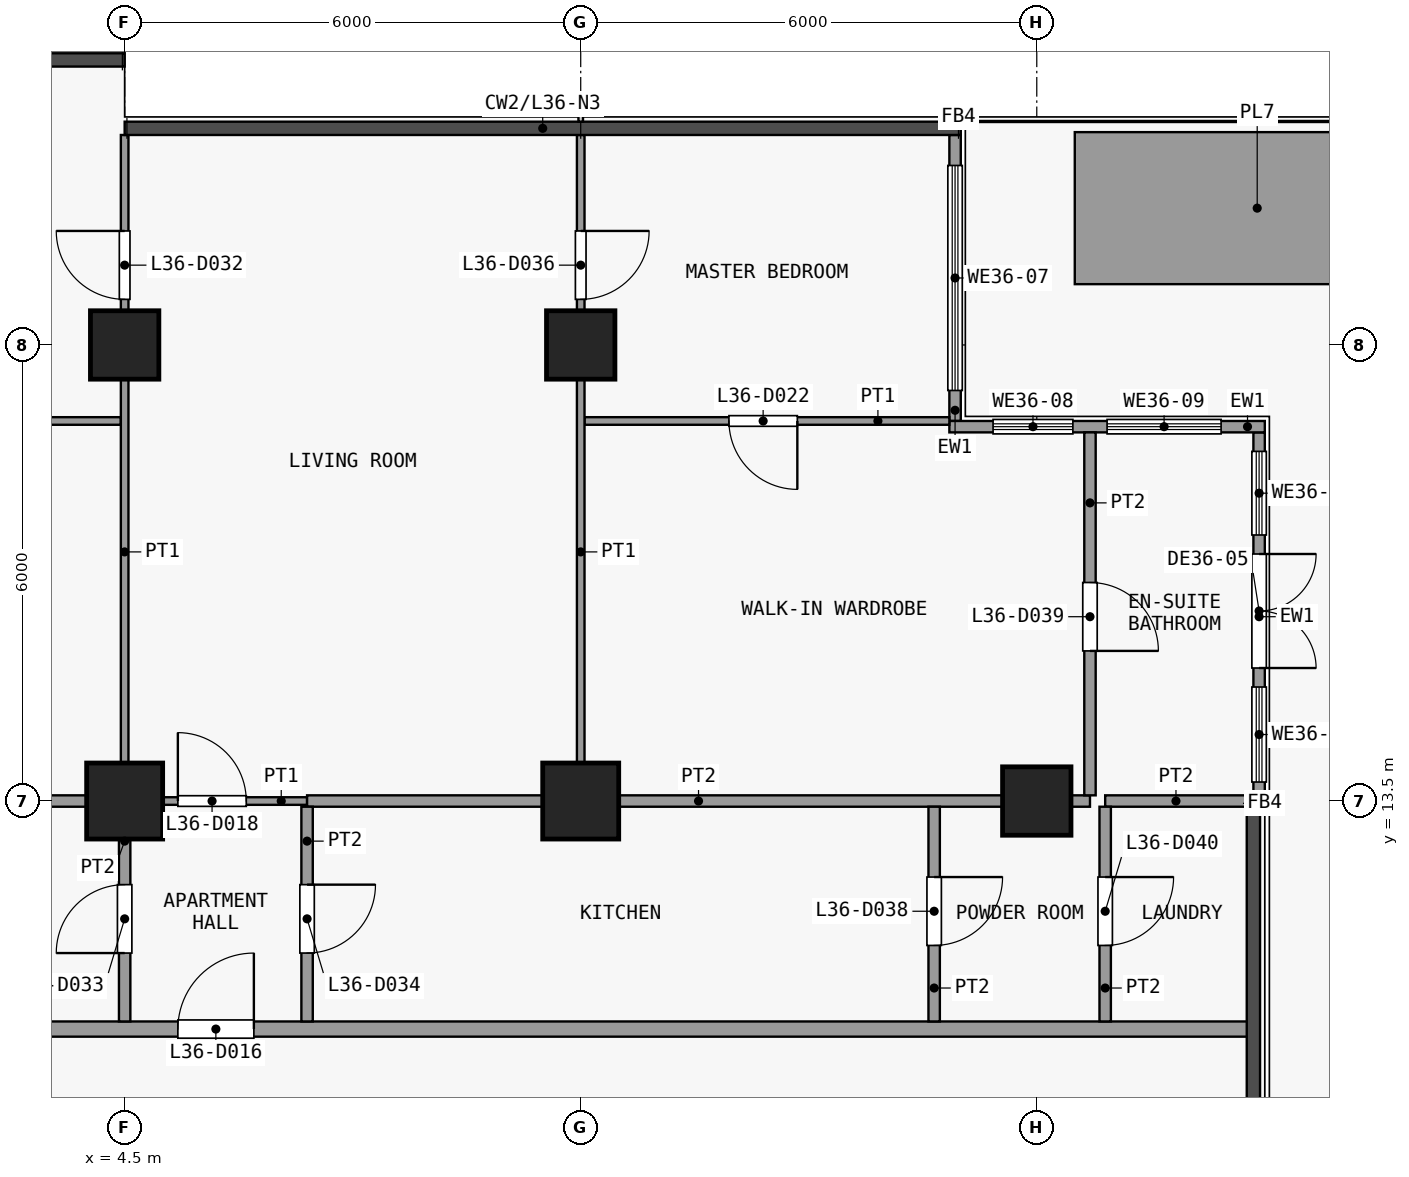
"""IFC4 building model, lengths in metres.
Left out: names, types, materials, properties, quantities, classifications, styles, units other than length and angle.
Written with IfcOpenShell. Run it as: python <this file> out.ifc"""

import sys

from ifc_helpers import new_model, si_unit, direction, frame, frame_2d, origin, origin_2d, place, context, subcontext, project, spatial, rectangle, extrude, element, fill, save


model = new_model("IFC4")
c1 = context("Model", 3, precision=1e-05, world=origin(), true_north=direction((0.0, 1.0)))
c2 = subcontext(c1, "Body", "Model", "MODEL_VIEW")
j1 = project(units=[si_unit("LENGTHUNIT", "METRE"), si_unit("PLANEANGLEUNIT", "RADIAN")], contexts=[c1])
p1 = place(None, origin())
s1 = spatial("IfcSite", under=j1, at=p1, CompositionType="ELEMENT")
p2 = place(p1, origin())
s2 = spatial("IfcBuilding", under=s1, at=p2, CompositionType="ELEMENT")
p3 = place(p2, frame((0.0, 0.0, 149.3)))
s3 = spatial("IfcBuildingStorey", under=s2, at=p3, CompositionType="ELEMENT", Elevation=149.3)
p4 = place(p3, frame((4.5, 13.5, 0.0), z_axis=(0.0, 0.0, 1.0), x_axis=(1.0, 0.0, 0.0)))
e1 = element("IfcColumn", 1, at=p4, inside=s3, PredefinedType="COLUMN", context=c2, shape_type="SweptSolid", body=[
    extrude(rectangle(XDim=1.0, YDim=1.0, at=origin_2d()), origin(), (0.0, 0.0, 1.0), 3.6),
])
p5 = place(p3, frame((4.5, 19.5, 0.0), z_axis=(0.0, 0.0, 1.0), x_axis=(1.0, 0.0, 0.0)))
e2 = element("IfcColumn", 2, at=p5, inside=s3, PredefinedType="COLUMN", context=c2, shape_type="SweptSolid", body=[
    extrude(rectangle(XDim=0.9, YDim=0.9, at=origin_2d()), origin(), (0.0, 0.0, 1.0), 3.6),
])
p6 = place(p3, frame((10.5, 13.5, 0.0), z_axis=(0.0, 0.0, 1.0), x_axis=(1.0, 0.0, 0.0)))
e3 = element("IfcColumn", 3, at=p6, inside=s3, PredefinedType="COLUMN", context=c2, shape_type="SweptSolid", body=[
    extrude(rectangle(XDim=1.0, YDim=1.0, at=origin_2d()), origin(), (0.0, 0.0, 1.0), 3.6),
])
for number, where, z_axis, x_axis in (
    (4, (10.5, 19.5, 0.0), (0.0, 0.0, 1.0), (1.0, 0.0, 0.0)),
    (5, (16.5, 13.5, 0.0), (0.0, 0.0, 1.0), (1.0, 0.0, 0.0)),
):
    element("IfcColumn", number, at=place(p3, frame(where, z_axis=z_axis, x_axis=x_axis)), inside=s3, PredefinedType="COLUMN", context=c2, shape_type="SweptSolid", body=[
        extrude(rectangle(XDim=0.9, YDim=0.9, at=origin_2d()), origin(), (0.0, 0.0, 1.0), 3.6),
    ])
p7 = place(p3, frame((15.425, 22.262, 0.0), z_axis=(0.0, 0.0, 1.0), x_axis=(0.0, -1.0, 0.0)))
e6 = element("IfcWall", 6, at=p7, inside=s3, PredefinedType="SOLIDWALL", context=c2, shape_type="SweptSolid", body=[
    extrude(rectangle(XDim=3.762, YDim=0.15, at=frame_2d((1.881, 0.0))), origin(), (0.0, 0.0, 1.0), 3.3),
])
p8 = place(p7, frame((0.401, 0.0, 0.9)))
e7 = element("IfcOpeningElement", 7, at=p8, cuts=e6, PredefinedType="OPENING", context=c2, shape_type="SweptSolid", body=[
    extrude(rectangle(XDim=2.96, YDim=2.4, at=frame_2d((1.48, 1.2))), frame((0.0, 0.085, 0.0), z_axis=(0.0, -1.0, 0.0), x_axis=(1.0, 0.0, 0.0)), (0.0, 0.0, 1.0), 0.17),
])
p9 = place(p3, frame((15.35, 18.425, 0.0), z_axis=(0.0, 0.0, 1.0), x_axis=(1.0, 0.0, 0.0)))
e8 = element("IfcWall", 8, at=p9, inside=s3, PredefinedType="SOLIDWALL", context=c2, shape_type="SweptSolid", body=[
    extrude(rectangle(XDim=4.15, YDim=0.15, at=frame_2d((2.075, 0.0))), origin(), (0.0, 0.0, 1.0), 3.3),
])
p10 = place(p9, frame((0.575, 0.0, 0.9)))
e9 = element("IfcOpeningElement", 9, at=p10, cuts=e8, PredefinedType="OPENING", context=c2, shape_type="SweptSolid", body=[
    extrude(rectangle(XDim=1.05, YDim=2.4, at=frame_2d((0.525, 1.2))), frame((0.0, 0.085, 0.0), z_axis=(0.0, -1.0, 0.0), x_axis=(1.0, 0.0, 0.0)), (0.0, 0.0, 1.0), 0.17),
])
p11 = place(p9, frame((2.075, 0.0, 0.9)))
e10 = element("IfcOpeningElement", 10, at=p11, cuts=e8, PredefinedType="OPENING", context=c2, shape_type="SweptSolid", body=[
    extrude(rectangle(XDim=1.5, YDim=2.4, at=frame_2d((0.75, 1.2))), frame((0.0, 0.085, 0.0), z_axis=(0.0, -1.0, 0.0), x_axis=(1.0, 0.0, 0.0)), (0.0, 0.0, 1.0), 0.17),
])
p12 = place(p3, frame((19.425, 18.35, 0.0), z_axis=(0.0, 0.0, 1.0), x_axis=(0.0, -1.0, 0.0)))
e11 = element("IfcWall", 11, at=p12, inside=s3, PredefinedType="SOLIDWALL", context=c2, shape_type="SweptSolid", body=[
    extrude(rectangle(XDim=4.85, YDim=0.15, at=frame_2d((2.425, 0.0))), origin(), (0.0, 0.0, 1.0), 3.3),
])
p13 = place(p12, frame((1.6, 0.0, 0.0)))
e12 = element("IfcOpeningElement", 12, at=p13, cuts=e11, PredefinedType="OPENING", context=c2, shape_type="SweptSolid", body=[
    extrude(rectangle(XDim=1.5, YDim=2.4, at=frame_2d((0.75, 1.2))), frame((0.0, 0.085, 0.0), z_axis=(0.0, -1.0, 0.0), x_axis=(1.0, 0.0, 0.0)), (0.0, 0.0, 1.0), 0.17),
])
p14 = place(p12, frame((3.35, 0.0, 0.9)))
e13 = element("IfcOpeningElement", 13, at=p14, cuts=e11, PredefinedType="OPENING", context=c2, shape_type="SweptSolid", body=[
    extrude(rectangle(XDim=1.25, YDim=2.1, at=frame_2d((0.625, 1.05))), frame((0.0, 0.085, 0.0), z_axis=(0.0, -1.0, 0.0), x_axis=(1.0, 0.0, 0.0)), (0.0, 0.0, 1.0), 0.17),
])
p15 = place(p12, frame((0.25, 0.0, 0.9)))
e14 = element("IfcOpeningElement", 14, at=p15, cuts=e11, PredefinedType="OPENING", context=c2, shape_type="SweptSolid", body=[
    extrude(rectangle(XDim=1.1, YDim=2.1, at=frame_2d((0.55, 1.05))), frame((0.0, 0.085, 0.0), z_axis=(0.0, -1.0, 0.0), x_axis=(1.0, 0.0, 0.0)), (0.0, 0.0, 1.0), 0.17),
])
p16 = place(p3, frame((17.0, 21.3, 0.0), z_axis=(0.0, 0.0, 1.0), x_axis=(1.0, 0.0, 0.0)))
e15 = element("IfcWall", 15, at=p16, inside=s3, PredefinedType="USERDEFINED", context=c2, shape_type="SweptSolid", body=[
    extrude(rectangle(XDim=4.8, YDim=2.0, at=frame_2d((2.4, 0.0))), origin(), (0.0, 0.0, 1.0), 0.9),
])
p17 = place(p3, frame((-17.85, 10.5, 0.0), z_axis=(0.0, 0.0, 1.0), x_axis=(1.0, 0.0, 0.0)))
e16 = element("IfcWall", 16, at=p17, inside=s3, PredefinedType="PARTITIONING", context=c2, shape_type="SweptSolid", body=[
    extrude(rectangle(XDim=37.2, YDim=0.2, at=frame_2d((18.6, 0.0))), origin(), (0.0, 0.0, 1.0), 3.3),
])
p18 = place(p17, frame((5.55, 0.0, 0.0)))
e17 = element("IfcOpeningElement", 17, at=p18, cuts=e16, PredefinedType="OPENING", context=c2, shape_type="SweptSolid", body=[
    extrude(rectangle(XDim=1.0, YDim=2.1, at=frame_2d((0.5, 1.05))), frame((0.0, 0.11, 0.0), z_axis=(0.0, -1.0, 0.0), x_axis=(1.0, 0.0, 0.0)), (0.0, 0.0, 1.0), 0.22),
])
p19 = place(p17, frame((23.05, 0.0, 0.0)))
e18 = element("IfcOpeningElement", 18, at=p19, cuts=e16, PredefinedType="OPENING", context=c2, shape_type="SweptSolid", body=[
    extrude(rectangle(XDim=1.0, YDim=2.1, at=frame_2d((0.5, 1.05))), frame((0.0, 0.11, 0.0), z_axis=(0.0, -1.0, 0.0), x_axis=(1.0, 0.0, 0.0)), (0.0, 0.0, 1.0), 0.22),
])
p20 = place(p3, frame((4.5, 13.5, 0.0), z_axis=(0.0, 0.0, 1.0), x_axis=(1.0, 0.0, 0.0)))
e19 = element("IfcWall", 19, at=p20, inside=s3, PredefinedType="PARTITIONING", context=c2, shape_type="SweptSolid", body=[
    extrude(rectangle(XDim=2.4, YDim=0.1, at=frame_2d((1.2, 0.0))), origin(), (0.0, 0.0, 1.0), 3.3),
])
p21 = place(p20, frame((0.7, 0.0, 0.0)))
e20 = element("IfcOpeningElement", 20, at=p21, cuts=e19, PredefinedType="OPENING", context=c2, shape_type="SweptSolid", body=[
    extrude(rectangle(XDim=0.9, YDim=2.1, at=frame_2d((0.45, 1.05))), frame((0.0, 0.06, 0.0), z_axis=(0.0, -1.0, 0.0), x_axis=(1.0, 0.0, 0.0)), (0.0, 0.0, 1.0), 0.12),
])
p22 = place(p3, frame((0.0, 13.5, 0.0), z_axis=(0.0, 0.0, 1.0), x_axis=(1.0, 0.0, 0.0)))
e21 = element("IfcWall", 21, at=p22, inside=s3, PredefinedType="PARTITIONING", context=c2, shape_type="SweptSolid", body=[
    extrude(rectangle(XDim=4.5, YDim=0.15, at=frame_2d((2.25, 0.0))), origin(), (0.0, 0.0, 1.0), 3.3),
])
p23 = place(p3, frame((6.9, 13.5, 0.0), z_axis=(0.0, 0.0, 1.0), x_axis=(1.0, 0.0, 0.0)))
e22 = element("IfcWall", 22, at=p23, inside=s3, PredefinedType="PARTITIONING", context=c2, shape_type="SweptSolid", body=[
    extrude(rectangle(XDim=10.3, YDim=0.15, at=frame_2d((5.15, 0.0))), origin(), (0.0, 0.0, 1.0), 3.3),
])
p24 = place(p3, frame((17.4, 13.5, 0.0), z_axis=(0.0, 0.0, 1.0), x_axis=(1.0, 0.0, 0.0)))
e23 = element("IfcWall", 23, at=p24, inside=s3, PredefinedType="PARTITIONING", context=c2, shape_type="SweptSolid", body=[
    extrude(rectangle(XDim=1.863, YDim=0.15, at=frame_2d((0.931, 0.0))), origin(), (0.0, 0.0, 1.0), 3.3),
])
p25 = place(p3, frame((-4.4, 18.5, 0.0), z_axis=(0.0, 0.0, 1.0), x_axis=(1.0, 0.0, 0.0)))
e24 = element("IfcWall", 24, at=p25, inside=s3, PredefinedType="PARTITIONING", context=c2, shape_type="SweptSolid", body=[
    extrude(rectangle(XDim=8.85, YDim=0.1, at=frame_2d((4.425, 0.0))), origin(), (0.0, 0.0, 1.0), 3.3),
])
p26 = place(p25, frame((4.0, 0.0, 0.0)))
e25 = element("IfcOpeningElement", 25, at=p26, cuts=e24, PredefinedType="OPENING", context=c2, shape_type="SweptSolid", body=[
    extrude(rectangle(XDim=0.9, YDim=2.1, at=frame_2d((0.45, 1.05))), frame((0.0, 0.06, 0.0), z_axis=(0.0, -1.0, 0.0), x_axis=(1.0, 0.0, 0.0)), (0.0, 0.0, 1.0), 0.12),
])
p27 = place(p3, frame((10.55, 18.5, 0.0), z_axis=(0.0, 0.0, 1.0), x_axis=(1.0, 0.0, 0.0)))
e26 = element("IfcWall", 26, at=p27, inside=s3, PredefinedType="PARTITIONING", context=c2, shape_type="SweptSolid", body=[
    extrude(rectangle(XDim=4.8, YDim=0.1, at=frame_2d((2.4, 0.0))), origin(), (0.0, 0.0, 1.0), 3.3),
])
p28 = place(p27, frame((1.9, 0.0, 0.0)))
e27 = element("IfcOpeningElement", 27, at=p28, cuts=e26, PredefinedType="OPENING", context=c2, shape_type="SweptSolid", body=[
    extrude(rectangle(XDim=0.9, YDim=2.1, at=frame_2d((0.45, 1.05))), frame((0.0, 0.06, 0.0), z_axis=(0.0, -1.0, 0.0), x_axis=(1.0, 0.0, 0.0)), (0.0, 0.0, 1.0), 0.12),
])
p29 = place(p3, frame((4.5, 13.575, 0.0), z_axis=(0.0, 0.0, 1.0), x_axis=(0.0, 1.0, 0.0)))
e28 = element("IfcWall", 28, at=p29, inside=s3, PredefinedType="PARTITIONING", context=c2, shape_type="SweptSolid", body=[
    extrude(rectangle(XDim=8.688, YDim=0.1, at=frame_2d((4.344, 0.0))), origin(), (0.0, 0.0, 1.0), 3.3),
])
p30 = place(p29, frame((6.525, 0.0, 0.0)))
e29 = element("IfcOpeningElement", 29, at=p30, cuts=e28, PredefinedType="OPENING", context=c2, shape_type="SweptSolid", body=[
    extrude(rectangle(XDim=0.9, YDim=2.1, at=frame_2d((0.45, 1.05))), frame((0.0, 0.06, 0.0), z_axis=(0.0, -1.0, 0.0), x_axis=(1.0, 0.0, 0.0)), (0.0, 0.0, 1.0), 0.12),
])
p31 = place(p3, frame((4.5, 10.6, 0.0), z_axis=(0.0, 0.0, 1.0), x_axis=(0.0, 1.0, 0.0)))
e30 = element("IfcWall", 30, at=p31, inside=s3, PredefinedType="PARTITIONING", context=c2, shape_type="SweptSolid", body=[
    extrude(rectangle(XDim=2.825, YDim=0.15, at=frame_2d((1.413, 0.0))), origin(), (0.0, 0.0, 1.0), 3.3),
])
p32 = place(p31, frame((0.9, 0.0, 0.0)))
e31 = element("IfcOpeningElement", 31, at=p32, cuts=e30, PredefinedType="OPENING", context=c2, shape_type="SweptSolid", body=[
    extrude(rectangle(XDim=0.9, YDim=2.1, at=frame_2d((0.45, 1.05))), frame((0.0, 0.085, 0.0), z_axis=(0.0, -1.0, 0.0), x_axis=(1.0, 0.0, 0.0)), (0.0, 0.0, 1.0), 0.17),
])
p33 = place(p3, frame((6.9, 10.6, 0.0), z_axis=(0.0, 0.0, 1.0), x_axis=(0.0, 1.0, 0.0)))
e32 = element("IfcWall", 32, at=p33, inside=s3, PredefinedType="PARTITIONING", context=c2, shape_type="SweptSolid", body=[
    extrude(rectangle(XDim=2.825, YDim=0.15, at=frame_2d((1.413, 0.0))), origin(), (0.0, 0.0, 1.0), 3.3),
])
p34 = place(p33, frame((0.9, 0.0, 0.0)))
e33 = element("IfcOpeningElement", 33, at=p34, cuts=e32, PredefinedType="OPENING", context=c2, shape_type="SweptSolid", body=[
    extrude(rectangle(XDim=0.9, YDim=2.1, at=frame_2d((0.45, 1.05))), frame((0.0, 0.085, 0.0), z_axis=(0.0, -1.0, 0.0), x_axis=(1.0, 0.0, 0.0)), (0.0, 0.0, 1.0), 0.17),
])
p35 = place(p3, frame((10.5, 13.575, 0.0), z_axis=(0.0, 0.0, 1.0), x_axis=(0.0, 1.0, 0.0)))
e34 = element("IfcWall", 34, at=p35, inside=s3, PredefinedType="PARTITIONING", context=c2, shape_type="SweptSolid", body=[
    extrude(rectangle(XDim=8.688, YDim=0.1, at=frame_2d((4.344, 0.0))), origin(), (0.0, 0.0, 1.0), 3.3),
])
p36 = place(p35, frame((6.525, 0.0, 0.0)))
e35 = element("IfcOpeningElement", 35, at=p36, cuts=e34, PredefinedType="OPENING", context=c2, shape_type="SweptSolid", body=[
    extrude(rectangle(XDim=0.9, YDim=2.1, at=frame_2d((0.45, 1.05))), frame((0.0, 0.06, 0.0), z_axis=(0.0, -1.0, 0.0), x_axis=(1.0, 0.0, 0.0)), (0.0, 0.0, 1.0), 0.12),
])
p37 = place(p3, frame((15.15, 10.6, 0.0), z_axis=(0.0, 0.0, 1.0), x_axis=(0.0, 1.0, 0.0)))
e36 = element("IfcWall", 36, at=p37, inside=s3, PredefinedType="PARTITIONING", context=c2, shape_type="SweptSolid", body=[
    extrude(rectangle(XDim=2.825, YDim=0.15, at=frame_2d((1.413, 0.0))), origin(), (0.0, 0.0, 1.0), 3.3),
])
p38 = place(p37, frame((1.0, 0.0, 0.0)))
e37 = element("IfcOpeningElement", 37, at=p38, cuts=e36, PredefinedType="OPENING", context=c2, shape_type="SweptSolid", body=[
    extrude(rectangle(XDim=0.9, YDim=2.1, at=frame_2d((0.45, 1.05))), frame((0.0, 0.085, 0.0), z_axis=(0.0, -1.0, 0.0), x_axis=(1.0, 0.0, 0.0)), (0.0, 0.0, 1.0), 0.17),
])
p39 = place(p3, frame((17.2, 13.575, 0.0), z_axis=(0.0, 0.0, 1.0), x_axis=(0.0, 1.0, 0.0)))
e38 = element("IfcWall", 38, at=p39, inside=s3, PredefinedType="PARTITIONING", context=c2, shape_type="SweptSolid", body=[
    extrude(rectangle(XDim=4.775, YDim=0.15, at=frame_2d((2.388, 0.0))), origin(), (0.0, 0.0, 1.0), 3.3),
])
p40 = place(p39, frame((1.9, 0.0, 0.0)))
e39 = element("IfcOpeningElement", 39, at=p40, cuts=e38, PredefinedType="OPENING", context=c2, shape_type="SweptSolid", body=[
    extrude(rectangle(XDim=0.9, YDim=2.1, at=frame_2d((0.45, 1.05))), frame((0.0, 0.085, 0.0), z_axis=(0.0, -1.0, 0.0), x_axis=(1.0, 0.0, 0.0)), (0.0, 0.0, 1.0), 0.17),
])
p41 = place(p3, frame((17.4, 10.6, 0.0), z_axis=(0.0, 0.0, 1.0), x_axis=(0.0, 1.0, 0.0)))
e40 = element("IfcWall", 40, at=p41, inside=s3, PredefinedType="PARTITIONING", context=c2, shape_type="SweptSolid", body=[
    extrude(rectangle(XDim=2.825, YDim=0.15, at=frame_2d((1.413, 0.0))), origin(), (0.0, 0.0, 1.0), 3.3),
])
p42 = place(p41, frame((1.0, 0.0, 0.0)))
e41 = element("IfcOpeningElement", 41, at=p42, cuts=e40, PredefinedType="OPENING", context=c2, shape_type="SweptSolid", body=[
    extrude(rectangle(XDim=0.9, YDim=2.1, at=frame_2d((0.45, 1.05))), frame((0.0, 0.085, 0.0), z_axis=(0.0, -1.0, 0.0), x_axis=(1.0, 0.0, 0.0)), (0.0, 0.0, 1.0), 0.17),
])
p43 = place(p8, origin())
e42 = element("IfcWindow", 42, at=p43, inside=s3, PartitioningType="SINGLE_PANEL", PredefinedType="WINDOW", context=c2, shape_type="SweptSolid", body=[
    extrude(rectangle(XDim=2.96, YDim=2.4, at=frame_2d((1.48, 1.2))), frame((0.0, 0.03, 0.0), z_axis=(0.0, -1.0, 0.0), x_axis=(1.0, 0.0, 0.0)), (0.0, 0.0, 1.0), 0.06),
])
fill(e7, e42)
p44 = place(p10, origin())
e43 = element("IfcWindow", 43, at=p44, inside=s3, PartitioningType="SINGLE_PANEL", PredefinedType="WINDOW", context=c2, shape_type="SweptSolid", body=[
    extrude(rectangle(XDim=1.05, YDim=2.4, at=frame_2d((0.525, 1.2))), frame((0.0, 0.03, 0.0), z_axis=(0.0, -1.0, 0.0), x_axis=(1.0, 0.0, 0.0)), (0.0, 0.0, 1.0), 0.06),
])
fill(e9, e43)
p45 = place(p11, origin())
e44 = element("IfcWindow", 44, at=p45, inside=s3, PartitioningType="SINGLE_PANEL", PredefinedType="WINDOW", context=c2, shape_type="SweptSolid", body=[
    extrude(rectangle(XDim=1.5, YDim=2.4, at=frame_2d((0.75, 1.2))), frame((0.0, 0.03, 0.0), z_axis=(0.0, -1.0, 0.0), x_axis=(1.0, 0.0, 0.0)), (0.0, 0.0, 1.0), 0.06),
])
fill(e10, e44)
p46 = place(p13, origin())
e45 = element("IfcDoor", 45, at=p46, inside=s3, OperationType="DOUBLE_DOOR_SINGLE_SWING", PredefinedType="DOOR", context=c2, shape_type="SweptSolid", body=[
    extrude(rectangle(XDim=1.5, YDim=2.4, at=frame_2d((0.75, 1.2))), frame((0.0, 0.025, 0.0), z_axis=(0.0, -1.0, 0.0), x_axis=(1.0, 0.0, 0.0)), (0.0, 0.0, 1.0), 0.05),
])
fill(e12, e45)
p47 = place(p14, origin())
e46 = element("IfcWindow", 46, at=p47, inside=s3, PartitioningType="SINGLE_PANEL", PredefinedType="WINDOW", context=c2, shape_type="SweptSolid", body=[
    extrude(rectangle(XDim=1.25, YDim=2.1, at=frame_2d((0.625, 1.05))), frame((0.0, 0.03, 0.0), z_axis=(0.0, -1.0, 0.0), x_axis=(1.0, 0.0, 0.0)), (0.0, 0.0, 1.0), 0.06),
])
fill(e13, e46)
p48 = place(p15, origin())
e47 = element("IfcWindow", 47, at=p48, inside=s3, PartitioningType="SINGLE_PANEL", PredefinedType="WINDOW", context=c2, shape_type="SweptSolid", body=[
    extrude(rectangle(XDim=1.1, YDim=2.1, at=frame_2d((0.55, 1.05))), frame((0.0, 0.03, 0.0), z_axis=(0.0, -1.0, 0.0), x_axis=(1.0, 0.0, 0.0)), (0.0, 0.0, 1.0), 0.06),
])
fill(e14, e47)
p49 = place(p19, origin())
e48 = element("IfcDoor", 48, at=p49, inside=s3, OperationType="SINGLE_SWING_LEFT", PredefinedType="DOOR", context=c2, shape_type="SweptSolid", body=[
    extrude(rectangle(XDim=1.0, YDim=2.1, at=frame_2d((0.5, 1.05))), frame((0.0, 0.025, 0.0), z_axis=(0.0, -1.0, 0.0), x_axis=(1.0, 0.0, 0.0)), (0.0, 0.0, 1.0), 0.05),
])
fill(e18, e48)
p50 = place(p21, origin())
e49 = element("IfcDoor", 49, at=p50, inside=s3, OperationType="SINGLE_SWING_RIGHT", PredefinedType="DOOR", context=c2, shape_type="SweptSolid", body=[
    extrude(rectangle(XDim=0.9, YDim=2.1, at=frame_2d((0.45, 1.05))), frame((0.0, 0.025, 0.0), z_axis=(0.0, -1.0, 0.0), x_axis=(1.0, 0.0, 0.0)), (0.0, 0.0, 1.0), 0.05),
])
fill(e20, e49)
p51 = place(p28, origin())
e50 = element("IfcDoor", 50, at=p51, inside=s3, OperationType="SINGLE_SWING_RIGHT", PredefinedType="DOOR", context=c2, shape_type="SweptSolid", body=[
    extrude(rectangle(XDim=0.9, YDim=2.1, at=frame_2d((0.45, 1.05))), frame((0.0, 0.025, 0.0), z_axis=(0.0, -1.0, 0.0), x_axis=(1.0, 0.0, 0.0)), (0.0, 0.0, 1.0), 0.05),
])
fill(e27, e50)
p52 = place(p30, origin())
e51 = element("IfcDoor", 51, at=p52, inside=s3, OperationType="SINGLE_SWING_LEFT", PredefinedType="DOOR", context=c2, shape_type="SweptSolid", body=[
    extrude(rectangle(XDim=0.9, YDim=2.1, at=frame_2d((0.45, 1.05))), frame((0.0, 0.025, 0.0), z_axis=(0.0, -1.0, 0.0), x_axis=(1.0, 0.0, 0.0)), (0.0, 0.0, 1.0), 0.05),
])
fill(e29, e51)
p53 = place(p32, origin())
e52 = element("IfcDoor", 52, at=p53, inside=s3, OperationType="SINGLE_SWING_RIGHT", PredefinedType="DOOR", context=c2, shape_type="SweptSolid", body=[
    extrude(rectangle(XDim=0.9, YDim=2.1, at=frame_2d((0.45, 1.05))), frame((0.0, 0.025, 0.0), z_axis=(0.0, -1.0, 0.0), x_axis=(1.0, 0.0, 0.0)), (0.0, 0.0, 1.0), 0.05),
])
fill(e31, e52)
p54 = place(p34, origin())
e53 = element("IfcDoor", 53, at=p54, inside=s3, OperationType="SINGLE_SWING_RIGHT", PredefinedType="DOOR", context=c2, shape_type="SweptSolid", body=[
    extrude(rectangle(XDim=0.9, YDim=2.1, at=frame_2d((0.45, 1.05))), frame((0.0, 0.025, 0.0), z_axis=(0.0, -1.0, 0.0), x_axis=(1.0, 0.0, 0.0)), (0.0, 0.0, 1.0), 0.05),
])
fill(e33, e53)
p55 = place(p36, origin())
e54 = element("IfcDoor", 54, at=p55, inside=s3, OperationType="SINGLE_SWING_RIGHT", PredefinedType="DOOR", context=c2, shape_type="SweptSolid", body=[
    extrude(rectangle(XDim=0.9, YDim=2.1, at=frame_2d((0.45, 1.05))), frame((0.0, 0.025, 0.0), z_axis=(0.0, -1.0, 0.0), x_axis=(1.0, 0.0, 0.0)), (0.0, 0.0, 1.0), 0.05),
])
fill(e35, e54)
p56 = place(p38, origin())
e55 = element("IfcDoor", 55, at=p56, inside=s3, OperationType="SINGLE_SWING_RIGHT", PredefinedType="DOOR", context=c2, shape_type="SweptSolid", body=[
    extrude(rectangle(XDim=0.9, YDim=2.1, at=frame_2d((0.45, 1.05))), frame((0.0, 0.025, 0.0), z_axis=(0.0, -1.0, 0.0), x_axis=(1.0, 0.0, 0.0)), (0.0, 0.0, 1.0), 0.05),
])
fill(e37, e55)
p57 = place(p40, origin())
e56 = element("IfcDoor", 56, at=p57, inside=s3, OperationType="SINGLE_SWING_LEFT", PredefinedType="DOOR", context=c2, shape_type="SweptSolid", body=[
    extrude(rectangle(XDim=0.9, YDim=2.1, at=frame_2d((0.45, 1.05))), frame((0.0, 0.025, 0.0), z_axis=(0.0, -1.0, 0.0), x_axis=(1.0, 0.0, 0.0)), (0.0, 0.0, 1.0), 0.05),
])
fill(e39, e56)
p58 = place(p42, origin())
e57 = element("IfcDoor", 57, at=p58, inside=s3, OperationType="SINGLE_SWING_RIGHT", PredefinedType="DOOR", context=c2, shape_type="SweptSolid", body=[
    extrude(rectangle(XDim=0.9, YDim=2.1, at=frame_2d((0.45, 1.05))), frame((0.0, 0.025, 0.0), z_axis=(0.0, -1.0, 0.0), x_axis=(1.0, 0.0, 0.0)), (0.0, 0.0, 1.0), 0.05),
])
fill(e41, e57)
save(model, sys.argv[1])
